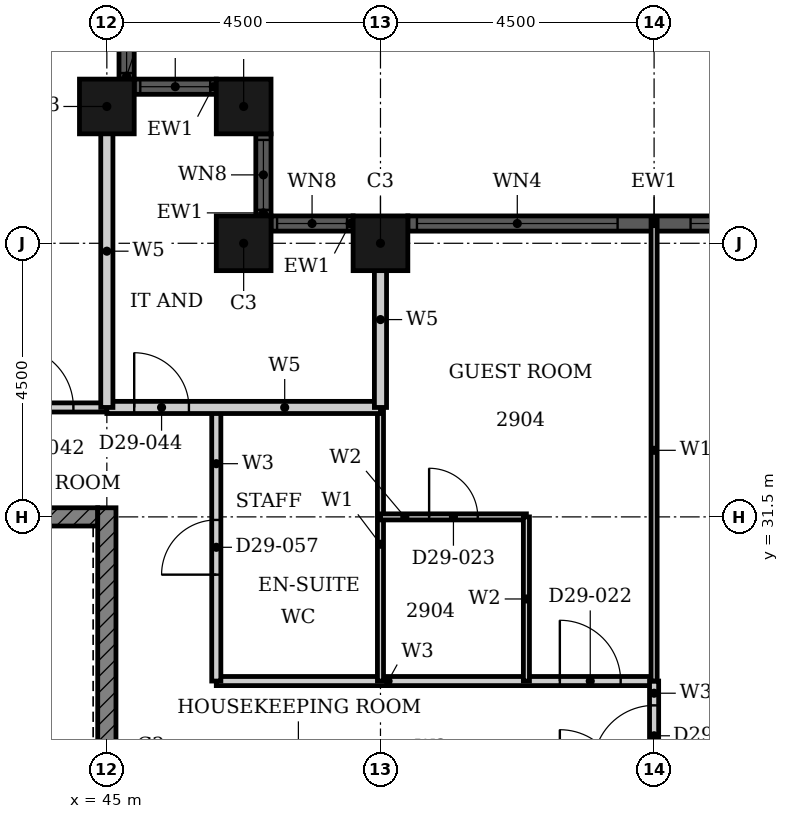
"""IFC4 building model, lengths in metres.
Left out: names, types, materials, properties, quantities, classifications, styles, units other than length and angle.
Written with IfcOpenShell. Run it as: python <this file> out.ifc"""

import sys

from ifc_helpers import new_model, si_unit, direction, frame, frame_2d, origin, origin_2d, place, context, subcontext, project, spatial, rectangle, hollow_rectangle, extrude, element, fill, save


model = new_model("IFC4")
c1 = context("Model", 3, precision=1e-05, world=origin(), true_north=direction((0.0, 1.0)))
c2 = subcontext(c1, "Body", "Model", "MODEL_VIEW")
j1 = project(units=[si_unit("LENGTHUNIT", "METRE"), si_unit("PLANEANGLEUNIT", "RADIAN")], contexts=[c1])
p1 = place(None, origin())
s1 = spatial("IfcSite", under=j1, at=p1, CompositionType="ELEMENT")
p2 = place(p1, origin())
s2 = spatial("IfcBuilding", under=s1, at=p2, CompositionType="ELEMENT")
p3 = place(p2, frame((0.0, 0.0, 118.8)))
s3 = spatial("IfcBuildingStorey", under=s2, at=p3, CompositionType="ELEMENT", Elevation=118.8)
for number, where, z_axis, x_axis in (
    (1, (49.5, 36.0, 0.0), (0.0, 0.0, 1.0), (1.0, 0.0, 0.0)),
    (2, (47.25, 36.0, 0.0), (0.0, 0.0, 1.0), (1.0, 0.0, 0.0)),
    (3, (47.25, 38.25, 0.0), (0.0, 0.0, 1.0), (1.0, 0.0, 0.0)),
    (4, (45.0, 38.25, 0.0), (0.0, 0.0, 1.0), (1.0, 0.0, 0.0)),
):
    element("IfcColumn", number, at=place(p3, frame(where, z_axis=z_axis, x_axis=x_axis)), inside=s3, PredefinedType="COLUMN", context=c2, shape_type="SweptSolid", body=[
        extrude(hollow_rectangle(XDim=0.9, YDim=0.9, WallThickness=0.028, at=origin_2d()), origin(), (0.0, 0.0, 1.0), 3.6),
    ])
p4 = place(p3, frame((58.05, 36.325, 0.0), z_axis=(0.0, 0.0, 1.0), x_axis=(-1.0, 0.0, 0.0)))
e5 = element("IfcWall", 5, at=p4, inside=s3, PredefinedType="SOLIDWALL", context=c2, shape_type="SweptSolid", body=[
    extrude(rectangle(XDim=8.1, YDim=0.25, at=frame_2d((4.05, 0.0))), origin(), (0.0, 0.0, 1.0), 3.6),
])
p5 = place(p4, frame((0.15, 0.0, 0.9)))
e6 = element("IfcOpeningElement", 6, at=p5, cuts=e5, PredefinedType="OPENING", context=c2, shape_type="SweptSolid", body=[
    extrude(rectangle(XDim=3.3, YDim=2.08, at=frame_2d((1.65, 1.04))), frame((0.0, 0.135, 0.0), z_axis=(0.0, -1.0, 0.0), x_axis=(1.0, 0.0, 0.0)), (0.0, 0.0, 1.0), 0.27),
])
p6 = place(p4, frame((4.65, 0.0, 0.9)))
e7 = element("IfcOpeningElement", 7, at=p6, cuts=e5, PredefinedType="OPENING", context=c2, shape_type="SweptSolid", body=[
    extrude(rectangle(XDim=3.3, YDim=2.08, at=frame_2d((1.65, 1.04))), frame((0.0, 0.135, 0.0), z_axis=(0.0, -1.0, 0.0), x_axis=(1.0, 0.0, 0.0)), (0.0, 0.0, 1.0), 0.27),
])
p7 = place(p3, frame((49.05, 36.325, 0.0), z_axis=(0.0, 0.0, 1.0), x_axis=(-1.0, 0.0, 0.0)))
e8 = element("IfcWall", 8, at=p7, inside=s3, PredefinedType="SOLIDWALL", context=c2, shape_type="SweptSolid", body=[
    extrude(rectangle(XDim=1.35, YDim=0.25, at=frame_2d((0.675, 0.0))), origin(), (0.0, 0.0, 1.0), 3.6),
])
p8 = place(p7, frame((0.1, 0.0, 0.9)))
e9 = element("IfcOpeningElement", 9, at=p8, cuts=e8, PredefinedType="OPENING", context=c2, shape_type="SweptSolid", body=[
    extrude(rectangle(XDim=1.15, YDim=2.08, at=frame_2d((0.575, 1.04))), frame((0.0, 0.135, 0.0), z_axis=(0.0, -1.0, 0.0), x_axis=(1.0, 0.0, 0.0)), (0.0, 0.0, 1.0), 0.27),
])
p9 = place(p3, frame((47.575, 36.45, 0.0), z_axis=(0.0, 0.0, 1.0), x_axis=(0.0, 1.0, 0.0)))
e10 = element("IfcWall", 10, at=p9, inside=s3, PredefinedType="SOLIDWALL", context=c2, shape_type="SweptSolid", body=[
    extrude(rectangle(XDim=1.35, YDim=0.25, at=frame_2d((0.675, 0.0))), origin(), (0.0, 0.0, 1.0), 3.6),
])
p10 = place(p9, frame((0.1, 0.0, 0.9)))
e11 = element("IfcOpeningElement", 11, at=p10, cuts=e10, PredefinedType="OPENING", context=c2, shape_type="SweptSolid", body=[
    extrude(rectangle(XDim=1.15, YDim=2.08, at=frame_2d((0.575, 1.04))), frame((0.0, 0.135, 0.0), z_axis=(0.0, -1.0, 0.0), x_axis=(1.0, 0.0, 0.0)), (0.0, 0.0, 1.0), 0.27),
])
p11 = place(p3, frame((46.8, 38.575, 0.0), z_axis=(0.0, 0.0, 1.0), x_axis=(-1.0, 0.0, 0.0)))
e12 = element("IfcWall", 12, at=p11, inside=s3, PredefinedType="SOLIDWALL", context=c2, shape_type="SweptSolid", body=[
    extrude(rectangle(XDim=1.35, YDim=0.25, at=frame_2d((0.675, 0.0))), origin(), (0.0, 0.0, 1.0), 3.6),
])
p12 = place(p11, frame((0.1, 0.0, 0.9)))
e13 = element("IfcOpeningElement", 13, at=p12, cuts=e12, PredefinedType="OPENING", context=c2, shape_type="SweptSolid", body=[
    extrude(rectangle(XDim=1.15, YDim=2.08, at=frame_2d((0.575, 1.04))), frame((0.0, 0.135, 0.0), z_axis=(0.0, -1.0, 0.0), x_axis=(1.0, 0.0, 0.0)), (0.0, 0.0, 1.0), 0.27),
])
p13 = place(p3, frame((45.325, 38.7, 0.0), z_axis=(0.0, 0.0, 1.0), x_axis=(0.0, 1.0, 0.0)))
e14 = element("IfcWall", 14, at=p13, inside=s3, PredefinedType="SOLIDWALL", context=c2, shape_type="SweptSolid", body=[
    extrude(rectangle(XDim=1.35, YDim=0.25, at=frame_2d((0.675, 0.0))), origin(), (0.0, 0.0, 1.0), 3.6),
])
p14 = place(p13, frame((0.1, 0.0, 0.9)))
e15 = element("IfcOpeningElement", 15, at=p14, cuts=e14, PredefinedType="OPENING", context=c2, shape_type="SweptSolid", body=[
    extrude(rectangle(XDim=1.15, YDim=2.08, at=frame_2d((0.575, 1.04))), frame((0.0, 0.135, 0.0), z_axis=(0.0, -1.0, 0.0), x_axis=(1.0, 0.0, 0.0)), (0.0, 0.0, 1.0), 0.27),
])
p15 = place(p3, frame((40.625, 31.5, 0.0), z_axis=(0.0, 0.0, 1.0), x_axis=(1.0, 0.0, 0.0)))
e16 = element("IfcWall", 16, at=p15, inside=s3, PredefinedType="SHEAR", context=c2, shape_type="SweptSolid", body=[
    extrude(rectangle(XDim=4.225, YDim=0.3, at=frame_2d((2.113, 0.0))), origin(), (0.0, 0.0, 1.0), 3.3),
])
p16 = place(p3, frame((45.0, 22.35, 0.0), z_axis=(0.0, 0.0, 1.0), x_axis=(0.0, 1.0, 0.0)))
e17 = element("IfcWall", 17, at=p16, inside=s3, PredefinedType="SHEAR", context=c2, shape_type="SweptSolid", body=[
    extrude(rectangle(XDim=9.3, YDim=0.3, at=frame_2d((4.65, 0.0))), origin(), (0.0, 0.0, 1.0), 3.3),
])
p17 = place(p3, frame((46.8, 28.8, 0.0), z_axis=(0.0, 0.0, 1.0), x_axis=(1.0, 0.0, 0.0)))
e18 = element("IfcWall", 18, at=p17, inside=s3, PredefinedType="PARTITIONING", context=c2, shape_type="SweptSolid", body=[
    extrude(rectangle(XDim=7.2, YDim=0.15, at=frame_2d((3.6, 0.0))), origin(), (0.0, 0.0, 1.0), 3.3),
])
p18 = place(p17, frame((5.65, 0.0, 0.0)))
e19 = element("IfcOpeningElement", 19, at=p18, cuts=e18, PredefinedType="OPENING", context=c2, shape_type="SweptSolid", body=[
    extrude(rectangle(XDim=1.0, YDim=2.1, at=frame_2d((0.5, 1.05))), frame((0.0, 0.085, 0.0), z_axis=(0.0, -1.0, 0.0), x_axis=(1.0, 0.0, 0.0)), (0.0, 0.0, 1.0), 0.17),
])
p19 = place(p3, frame((33.3, 33.3, 0.0), z_axis=(0.0, 0.0, 1.0), x_axis=(1.0, 0.0, 0.0)))
e20 = element("IfcWall", 20, at=p19, inside=s3, PredefinedType="PARTITIONING", context=c2, shape_type="SweptSolid", body=[
    extrude(rectangle(XDim=11.7, YDim=0.15, at=frame_2d((5.85, 0.0))), origin(), (0.0, 0.0, 1.0), 3.3),
])
p20 = place(p19, frame((10.15, 0.0, 0.0)))
e21 = element("IfcOpeningElement", 21, at=p20, cuts=e20, PredefinedType="OPENING", context=c2, shape_type="SweptSolid", body=[
    extrude(rectangle(XDim=1.0, YDim=2.1, at=frame_2d((0.5, 1.05))), frame((0.0, 0.085, 0.0), z_axis=(0.0, -1.0, 0.0), x_axis=(1.0, 0.0, 0.0)), (0.0, 0.0, 1.0), 0.17),
])
p21 = place(p19, frame((3.15, 0.0, 0.0)))
e22 = element("IfcOpeningElement", 22, at=p21, cuts=e20, PredefinedType="OPENING", context=c2, shape_type="SweptSolid", body=[
    extrude(rectangle(XDim=0.9, YDim=2.1, at=frame_2d((0.45, 1.05))), frame((0.0, 0.085, 0.0), z_axis=(0.0, -1.0, 0.0), x_axis=(1.0, 0.0, 0.0)), (0.0, 0.0, 1.0), 0.17),
])
p22 = place(p3, frame((46.8, 28.8, 0.0), z_axis=(0.0, 0.0, 1.0), x_axis=(0.0, 1.0, 0.0)))
e23 = element("IfcWall", 23, at=p22, inside=s3, PredefinedType="PARTITIONING", context=c2, shape_type="SweptSolid", body=[
    extrude(rectangle(XDim=4.5, YDim=0.15, at=frame_2d((2.25, 0.0))), origin(), (0.0, 0.0, 1.0), 3.3),
])
p23 = place(p22, frame((1.75, 0.0, 0.0)))
e24 = element("IfcOpeningElement", 24, at=p23, cuts=e23, PredefinedType="OPENING", context=c2, shape_type="SweptSolid", body=[
    extrude(rectangle(XDim=0.9, YDim=2.1, at=frame_2d((0.45, 1.05))), frame((0.0, 0.085, 0.0), z_axis=(0.0, -1.0, 0.0), x_axis=(1.0, 0.0, 0.0)), (0.0, 0.0, 1.0), 0.17),
])
p24 = place(p3, frame((54.0, 27.0, 0.0), z_axis=(0.0, 0.0, 1.0), x_axis=(0.0, 1.0, 0.0)))
e25 = element("IfcWall", 25, at=p24, inside=s3, PredefinedType="PARTITIONING", context=c2, shape_type="SweptSolid", body=[
    extrude(rectangle(XDim=1.8, YDim=0.15, at=frame_2d((0.9, 0.0))), origin(), (0.0, 0.0, 1.0), 3.3),
])
p25 = place(p24, frame((0.4, 0.0, 0.0)))
e26 = element("IfcOpeningElement", 26, at=p25, cuts=e25, PredefinedType="OPENING", context=c2, shape_type="SweptSolid", body=[
    extrude(rectangle(XDim=1.0, YDim=2.1, at=frame_2d((0.5, 1.05))), frame((0.0, 0.085, 0.0), z_axis=(0.0, -1.0, 0.0), x_axis=(1.0, 0.0, 0.0)), (0.0, 0.0, 1.0), 0.17),
])
p26 = place(p3, frame((49.5, 28.8, 0.0), z_axis=(0.0, 0.0, 1.0), x_axis=(0.0, 1.0, 0.0)))
e27 = element("IfcWall", 27, at=p26, inside=s3, PredefinedType="PARTITIONING", context=c2, shape_type="SweptSolid", body=[
    extrude(rectangle(XDim=4.5, YDim=0.1, at=frame_2d((2.25, 0.0))), origin(), (0.0, 0.0, 1.0), 2.38),
])
p27 = place(p3, frame((54.0, 28.8, 0.0), z_axis=(0.0, 0.0, 1.0), x_axis=(0.0, 1.0, 0.0)))
e28 = element("IfcWall", 28, at=p27, inside=s3, PredefinedType="PARTITIONING", context=c2, shape_type="SweptSolid", body=[
    extrude(rectangle(XDim=7.59, YDim=0.1, at=frame_2d((3.795, 0.0))), origin(), (0.0, 0.0, 1.0), 3.3),
])
p28 = place(p3, frame((49.5, 31.5, 0.0), z_axis=(0.0, 0.0, 1.0), x_axis=(1.0, 0.0, 0.0)))
e29 = element("IfcWall", 29, at=p28, inside=s3, PredefinedType="PARTITIONING", context=c2, shape_type="SweptSolid", body=[
    extrude(rectangle(XDim=2.4, YDim=0.1, at=frame_2d((1.2, 0.0))), origin(), (0.0, 0.0, 1.0), 2.58),
])
p29 = place(p28, frame((0.8, 0.0, 0.0)))
e30 = element("IfcOpeningElement", 30, at=p29, cuts=e29, PredefinedType="OPENING", context=c2, shape_type="SweptSolid", body=[
    extrude(rectangle(XDim=0.8, YDim=2.1, at=frame_2d((0.4, 1.05))), frame((0.0, 0.06, 0.0), z_axis=(0.0, -1.0, 0.0), x_axis=(1.0, 0.0, 0.0)), (0.0, 0.0, 1.0), 0.12),
])
p30 = place(p3, frame((51.9, 28.8, 0.0), z_axis=(0.0, 0.0, 1.0), x_axis=(0.0, 1.0, 0.0)))
e31 = element("IfcWall", 31, at=p30, inside=s3, PredefinedType="PARTITIONING", context=c2, shape_type="SweptSolid", body=[
    extrude(rectangle(XDim=2.7, YDim=0.1, at=frame_2d((1.35, 0.0))), origin(), (0.0, 0.0, 1.0), 3.3),
])
p31 = place(p3, frame((45.0, 33.3, 0.0), z_axis=(0.0, 0.0, 1.0), x_axis=(1.0, 0.0, 0.0)))
e32 = element("IfcWall", 32, at=p31, inside=s3, PredefinedType="PARTITIONING", context=c2, shape_type="SweptSolid", body=[
    extrude(rectangle(XDim=4.5, YDim=0.2, at=frame_2d((2.25, 0.0))), origin(), (0.0, 0.0, 1.0), 3.3),
])
p32 = place(p31, frame((0.45, 0.0, 0.0)))
e33 = element("IfcOpeningElement", 33, at=p32, cuts=e32, PredefinedType="OPENING", context=c2, shape_type="SweptSolid", body=[
    extrude(rectangle(XDim=0.9, YDim=2.1, at=frame_2d((0.45, 1.05))), frame((0.0, 0.11, 0.0), z_axis=(0.0, -1.0, 0.0), x_axis=(1.0, 0.0, 0.0)), (0.0, 0.0, 1.0), 0.22),
])
p33 = place(p3, frame((45.0, 33.3, 0.0), z_axis=(0.0, 0.0, 1.0), x_axis=(0.0, 1.0, 0.0)))
e34 = element("IfcWall", 34, at=p33, inside=s3, PredefinedType="PARTITIONING", context=c2, shape_type="SweptSolid", body=[
    extrude(rectangle(XDim=5.14, YDim=0.2, at=frame_2d((2.57, 0.0))), origin(), (0.0, 0.0, 1.0), 3.3),
])
p34 = place(p3, frame((49.5, 33.3, 0.0), z_axis=(0.0, 0.0, 1.0), x_axis=(0.0, 1.0, 0.0)))
e35 = element("IfcWall", 35, at=p34, inside=s3, PredefinedType="PARTITIONING", context=c2, shape_type="SweptSolid", body=[
    extrude(rectangle(XDim=2.89, YDim=0.2, at=frame_2d((1.445, 0.0))), origin(), (0.0, 0.0, 1.0), 2.38),
])
p35 = place(p5, origin())
e36 = element("IfcWindow", 36, at=p35, inside=s3, PartitioningType="SINGLE_PANEL", PredefinedType="WINDOW", context=c2, shape_type="SweptSolid", body=[
    extrude(rectangle(XDim=3.3, YDim=2.08, at=frame_2d((1.65, 1.04))), frame((0.0, 0.03, 0.0), z_axis=(0.0, -1.0, 0.0), x_axis=(1.0, 0.0, 0.0)), (0.0, 0.0, 1.0), 0.06),
])
fill(e6, e36)
p36 = place(p6, origin())
e37 = element("IfcWindow", 37, at=p36, inside=s3, PartitioningType="SINGLE_PANEL", PredefinedType="WINDOW", context=c2, shape_type="SweptSolid", body=[
    extrude(rectangle(XDim=3.3, YDim=2.08, at=frame_2d((1.65, 1.04))), frame((0.0, 0.03, 0.0), z_axis=(0.0, -1.0, 0.0), x_axis=(1.0, 0.0, 0.0)), (0.0, 0.0, 1.0), 0.06),
])
fill(e7, e37)
p37 = place(p8, origin())
e38 = element("IfcWindow", 38, at=p37, inside=s3, PartitioningType="SINGLE_PANEL", PredefinedType="WINDOW", context=c2, shape_type="SweptSolid", body=[
    extrude(rectangle(XDim=1.15, YDim=2.08, at=frame_2d((0.575, 1.04))), frame((0.0, 0.03, 0.0), z_axis=(0.0, -1.0, 0.0), x_axis=(1.0, 0.0, 0.0)), (0.0, 0.0, 1.0), 0.06),
])
fill(e9, e38)
p38 = place(p10, origin())
e39 = element("IfcWindow", 39, at=p38, inside=s3, PartitioningType="SINGLE_PANEL", PredefinedType="WINDOW", context=c2, shape_type="SweptSolid", body=[
    extrude(rectangle(XDim=1.15, YDim=2.08, at=frame_2d((0.575, 1.04))), frame((0.0, 0.03, 0.0), z_axis=(0.0, -1.0, 0.0), x_axis=(1.0, 0.0, 0.0)), (0.0, 0.0, 1.0), 0.06),
])
fill(e11, e39)
p39 = place(p12, origin())
e40 = element("IfcWindow", 40, at=p39, inside=s3, PartitioningType="SINGLE_PANEL", PredefinedType="WINDOW", context=c2, shape_type="SweptSolid", body=[
    extrude(rectangle(XDim=1.15, YDim=2.08, at=frame_2d((0.575, 1.04))), frame((0.0, 0.03, 0.0), z_axis=(0.0, -1.0, 0.0), x_axis=(1.0, 0.0, 0.0)), (0.0, 0.0, 1.0), 0.06),
])
fill(e13, e40)
p40 = place(p14, origin())
e41 = element("IfcWindow", 41, at=p40, inside=s3, PartitioningType="SINGLE_PANEL", PredefinedType="WINDOW", context=c2, shape_type="SweptSolid", body=[
    extrude(rectangle(XDim=1.15, YDim=2.08, at=frame_2d((0.575, 1.04))), frame((0.0, 0.03, 0.0), z_axis=(0.0, -1.0, 0.0), x_axis=(1.0, 0.0, 0.0)), (0.0, 0.0, 1.0), 0.06),
])
fill(e15, e41)
p41 = place(p18, origin())
e42 = element("IfcDoor", 42, at=p41, inside=s3, OperationType="SINGLE_SWING_RIGHT", PredefinedType="DOOR", context=c2, shape_type="SweptSolid", body=[
    extrude(rectangle(XDim=1.0, YDim=2.1, at=frame_2d((0.5, 1.05))), frame((0.0, 0.025, 0.0), z_axis=(0.0, -1.0, 0.0), x_axis=(1.0, 0.0, 0.0)), (0.0, 0.0, 1.0), 0.05),
])
fill(e19, e42)
p42 = place(p29, origin())
e43 = element("IfcDoor", 43, at=p42, inside=s3, OperationType="SINGLE_SWING_RIGHT", PredefinedType="DOOR", context=c2, shape_type="SweptSolid", body=[
    extrude(rectangle(XDim=0.8, YDim=2.1, at=frame_2d((0.4, 1.05))), frame((0.0, 0.025, 0.0), z_axis=(0.0, -1.0, 0.0), x_axis=(1.0, 0.0, 0.0)), (0.0, 0.0, 1.0), 0.05),
])
fill(e30, e43)
p43 = place(p25, origin())
e44 = element("IfcDoor", 44, at=p43, inside=s3, OperationType="SINGLE_SWING_LEFT", PredefinedType="DOOR", context=c2, shape_type="SweptSolid", body=[
    extrude(rectangle(XDim=1.0, YDim=2.1, at=frame_2d((0.5, 1.05))), frame((0.0, 0.025, 0.0), z_axis=(0.0, -1.0, 0.0), x_axis=(1.0, 0.0, 0.0)), (0.0, 0.0, 1.0), 0.05),
])
fill(e26, e44)
p44 = place(p20, origin())
e45 = element("IfcDoor", 45, at=p44, inside=s3, OperationType="SINGLE_SWING_RIGHT", PredefinedType="DOOR", context=c2, shape_type="SweptSolid", body=[
    extrude(rectangle(XDim=1.0, YDim=2.1, at=frame_2d((0.5, 1.05))), frame((0.0, 0.025, 0.0), z_axis=(0.0, -1.0, 0.0), x_axis=(1.0, 0.0, 0.0)), (0.0, 0.0, 1.0), 0.05),
])
fill(e21, e45)
p45 = place(p32, origin())
e46 = element("IfcDoor", 46, at=p45, inside=s3, OperationType="SINGLE_SWING_RIGHT", PredefinedType="DOOR", context=c2, shape_type="SweptSolid", body=[
    extrude(rectangle(XDim=0.9, YDim=2.1, at=frame_2d((0.45, 1.05))), frame((0.0, 0.025, 0.0), z_axis=(0.0, -1.0, 0.0), x_axis=(1.0, 0.0, 0.0)), (0.0, 0.0, 1.0), 0.05),
])
fill(e33, e46)
p46 = place(p23, origin())
e47 = element("IfcDoor", 47, at=p46, inside=s3, OperationType="SINGLE_SWING_LEFT", PredefinedType="DOOR", context=c2, shape_type="SweptSolid", body=[
    extrude(rectangle(XDim=0.9, YDim=2.1, at=frame_2d((0.45, 1.05))), frame((0.0, 0.025, 0.0), z_axis=(0.0, -1.0, 0.0), x_axis=(1.0, 0.0, 0.0)), (0.0, 0.0, 1.0), 0.05),
])
fill(e24, e47)
save(model, sys.argv[1])
